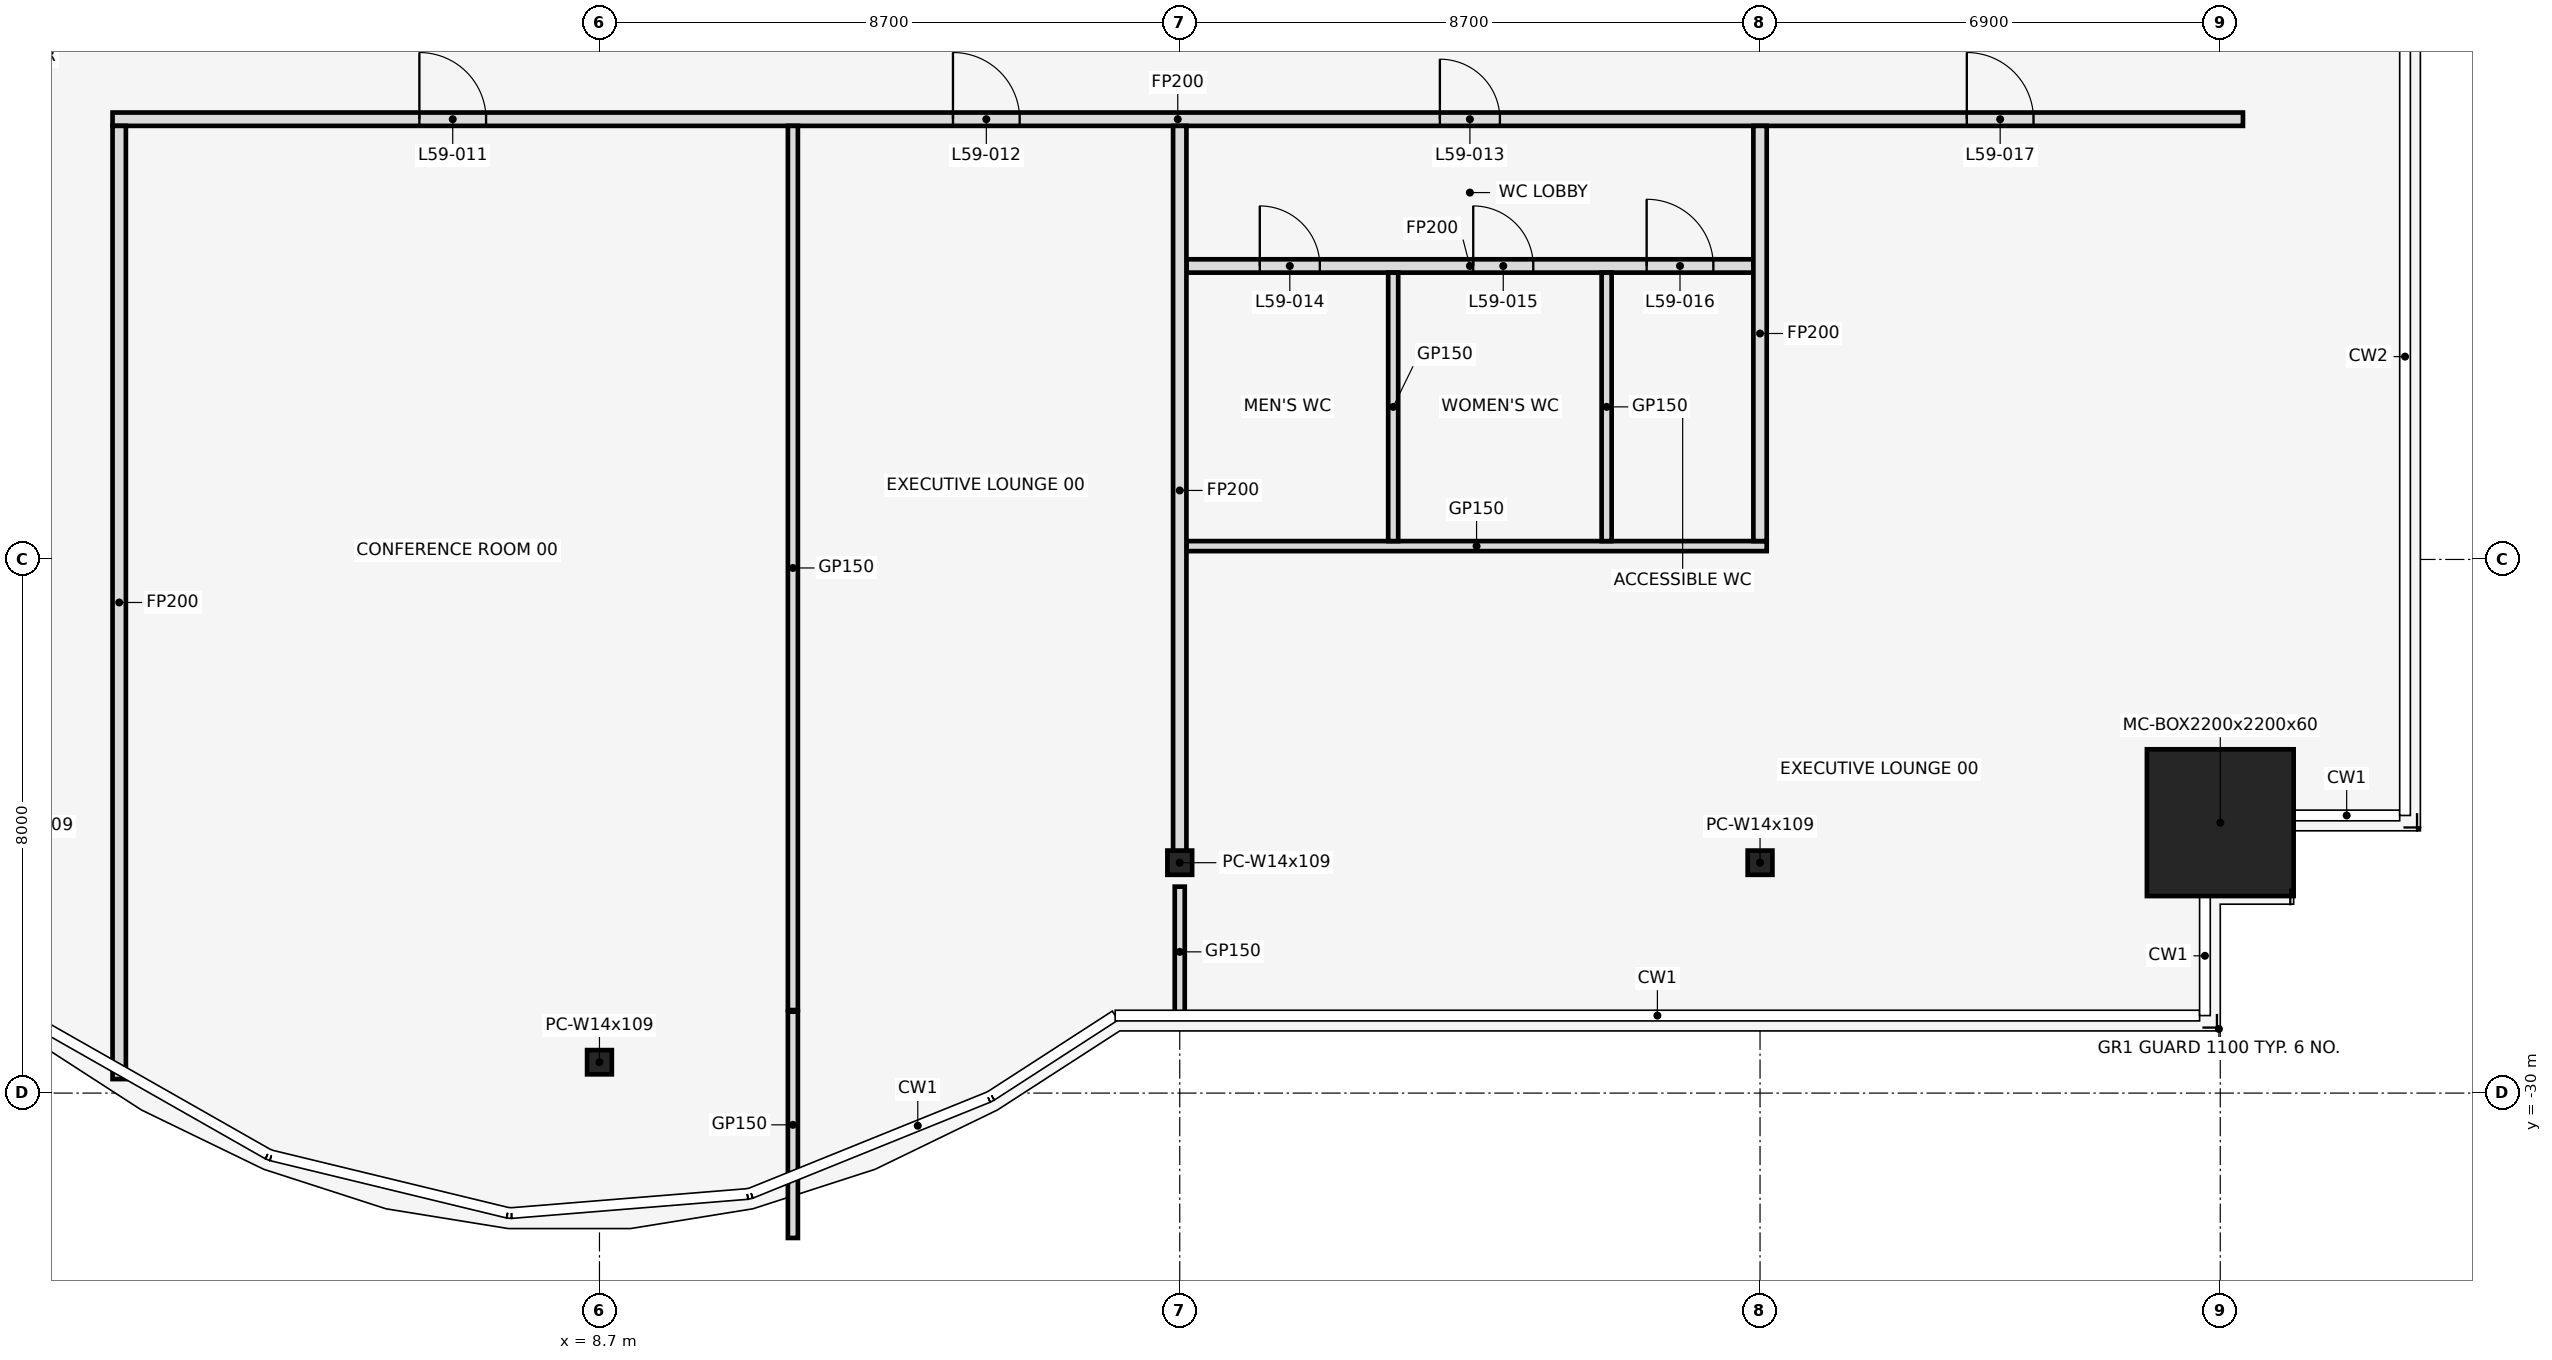
"""IFC4 building model, lengths in metres.
Left out: names, types, materials, properties, quantities, classifications, styles, units other than length and angle.
Written with IfcOpenShell. Run it as: python <this file> out.ifc"""

import sys

from ifc_helpers import new_model, si_unit, direction, frame, frame_2d, origin, origin_2d, place, context, subcontext, project, spatial, rectangle, hollow_rectangle, i_section, extrude, element, fill, save


model = new_model("IFC4")
c1 = context("Model", 3, precision=1e-05, world=origin(), true_north=direction((0.0, 1.0)))
c2 = subcontext(c1, "Body", "Model", "MODEL_VIEW")
j1 = project(units=[si_unit("LENGTHUNIT", "METRE"), si_unit("PLANEANGLEUNIT", "RADIAN")], contexts=[c1])
p1 = place(None, origin())
s1 = spatial("IfcSite", under=j1, at=p1, CompositionType="ELEMENT")
p2 = place(p1, origin())
s2 = spatial("IfcBuilding", under=s1, at=p2, CompositionType="ELEMENT")
p3 = place(p2, frame((0.0, 0.0, 262.4)))
s3 = spatial("IfcBuildingStorey", under=s2, at=p3, CompositionType="ELEMENT", Elevation=262.4)
for number, where, z_axis, x_axis in (
    (1, (8.7, -29.537, 0.0), (0.0, 0.0, 1.0), (1.0, 0.0, 0.0)),
    (2, (17.4, -26.546, 0.0), (0.0, 0.0, 1.0), (1.0, 0.0, 0.0)),
    (3, (26.1, -26.546, 0.0), (0.0, 0.0, 1.0), (1.0, 0.0, 0.0)),
):
    element("IfcColumn", number, at=place(p3, frame(where, z_axis=z_axis, x_axis=x_axis)), inside=s3, PredefinedType="COLUMN", context=c2, shape_type="SweptSolid", body=[
        extrude(i_section(OverallWidth=0.371, OverallDepth=0.363, WebThickness=0.013, FlangeThickness=0.022, at=origin_2d()), origin(), (0.0, 0.0, 1.0), 4.2),
    ])
p4 = place(p3, frame((33.0, -25.946, 0.0), z_axis=(0.0, 0.0, 1.0), x_axis=(1.0, 0.0, 0.0)))
e4 = element("IfcColumn", 4, at=p4, inside=s3, PredefinedType="COLUMN", context=c2, shape_type="SweptSolid", body=[
    extrude(hollow_rectangle(XDim=2.2, YDim=2.2, WallThickness=0.06, at=origin_2d()), origin(), (0.0, 0.0, 1.0), 4.2),
])
p5 = place(p3, frame((17.5, -21.8, 0.0), z_axis=(0.0, 0.0, 1.0), x_axis=(1.0, 0.0, 0.0)))
e5 = element("IfcWall", 5, at=p5, inside=s3, PredefinedType="PARTITIONING", context=c2, shape_type="SweptSolid", body=[
    extrude(rectangle(XDim=8.7, YDim=0.15, at=frame_2d((4.35, 0.0))), origin(), (0.0, 0.0, 1.0), 3.118),
])
p6 = place(p3, frame((17.5, -17.6, 0.0), z_axis=(0.0, 0.0, 1.0), x_axis=(1.0, 0.0, 0.0)))
e6 = element("IfcWall", 6, at=p6, inside=s3, PredefinedType="PARTITIONING", context=c2, shape_type="SweptSolid", body=[
    extrude(rectangle(XDim=8.5, YDim=0.2, at=frame_2d((4.25, 0.0))), origin(), (0.0, 0.0, 1.0), 3.118),
])
p7 = place(p6, frame((1.1, 0.0, 0.0)))
e7 = element("IfcOpeningElement", 7, at=p7, cuts=e6, PredefinedType="OPENING", context=c2, shape_type="SweptSolid", body=[
    extrude(rectangle(XDim=0.9, YDim=2.1, at=frame_2d((0.45, 1.05))), frame((0.0, 0.112, 0.0), z_axis=(0.0, -1.0, 0.0), x_axis=(1.0, 0.0, 0.0)), (0.0, 0.0, 1.0), 0.224),
])
p8 = place(p6, frame((4.3, 0.0, 0.0)))
e8 = element("IfcOpeningElement", 8, at=p8, cuts=e6, PredefinedType="OPENING", context=c2, shape_type="SweptSolid", body=[
    extrude(rectangle(XDim=0.9, YDim=2.1, at=frame_2d((0.45, 1.05))), frame((0.0, 0.112, 0.0), z_axis=(0.0, -1.0, 0.0), x_axis=(1.0, 0.0, 0.0)), (0.0, 0.0, 1.0), 0.224),
])
p9 = place(p6, frame((6.9, 0.0, 0.0)))
e9 = element("IfcOpeningElement", 9, at=p9, cuts=e6, PredefinedType="OPENING", context=c2, shape_type="SweptSolid", body=[
    extrude(rectangle(XDim=1.0, YDim=2.1, at=frame_2d((0.5, 1.05))), frame((0.0, 0.112, 0.0), z_axis=(0.0, -1.0, 0.0), x_axis=(1.0, 0.0, 0.0)), (0.0, 0.0, 1.0), 0.224),
])
p10 = place(p3, frame((1.4, -15.4, 0.0), z_axis=(0.0, 0.0, 1.0), x_axis=(1.0, 0.0, 0.0)))
e10 = element("IfcWall", 10, at=p10, inside=s3, PredefinedType="PARTITIONING", context=c2, shape_type="SweptSolid", body=[
    extrude(rectangle(XDim=31.94, YDim=0.2, at=frame_2d((15.97, 0.0))), origin(), (0.0, 0.0, 1.0), 3.118),
])
p11 = place(p10, frame((4.6, 0.0, 0.0)))
e11 = element("IfcOpeningElement", 11, at=p11, cuts=e10, PredefinedType="OPENING", context=c2, shape_type="SweptSolid", body=[
    extrude(rectangle(XDim=1.0, YDim=2.1, at=frame_2d((0.5, 1.05))), frame((0.0, 0.112, 0.0), z_axis=(0.0, -1.0, 0.0), x_axis=(1.0, 0.0, 0.0)), (0.0, 0.0, 1.0), 0.224),
])
p12 = place(p10, frame((12.6, 0.0, 0.0)))
e12 = element("IfcOpeningElement", 12, at=p12, cuts=e10, PredefinedType="OPENING", context=c2, shape_type="SweptSolid", body=[
    extrude(rectangle(XDim=1.0, YDim=2.1, at=frame_2d((0.5, 1.05))), frame((0.0, 0.112, 0.0), z_axis=(0.0, -1.0, 0.0), x_axis=(1.0, 0.0, 0.0)), (0.0, 0.0, 1.0), 0.224),
])
p13 = place(p10, frame((19.9, 0.0, 0.0)))
e13 = element("IfcOpeningElement", 13, at=p13, cuts=e10, PredefinedType="OPENING", context=c2, shape_type="SweptSolid", body=[
    extrude(rectangle(XDim=0.9, YDim=2.1, at=frame_2d((0.45, 1.05))), frame((0.0, 0.112, 0.0), z_axis=(0.0, -1.0, 0.0), x_axis=(1.0, 0.0, 0.0)), (0.0, 0.0, 1.0), 0.224),
])
p14 = place(p10, frame((27.8, 0.0, 0.0)))
e14 = element("IfcOpeningElement", 14, at=p14, cuts=e10, PredefinedType="OPENING", context=c2, shape_type="SweptSolid", body=[
    extrude(rectangle(XDim=1.0, YDim=2.1, at=frame_2d((0.5, 1.05))), frame((0.0, 0.112, 0.0), z_axis=(0.0, -1.0, 0.0), x_axis=(1.0, 0.0, 0.0)), (0.0, 0.0, 1.0), 0.224),
])
p15 = place(p3, frame((1.5, -29.79, 0.0), z_axis=(0.0, 0.0, 1.0), x_axis=(0.0, 1.0, 0.0)))
e15 = element("IfcWall", 15, at=p15, inside=s3, PredefinedType="PARTITIONING", context=c2, shape_type="SweptSolid", body=[
    extrude(rectangle(XDim=14.29, YDim=0.2, at=frame_2d((7.145, 0.0))), origin(), (0.0, 0.0, 1.0), 3.118),
])
p16 = place(p3, frame((11.6, -32.172, 0.0), z_axis=(0.0, 0.0, 1.0), x_axis=(0.0, 1.0, 0.0)))
e16 = element("IfcWall", 16, at=p16, inside=s3, PredefinedType="PARTITIONING", context=c2, shape_type="SweptSolid", body=[
    extrude(rectangle(XDim=3.392, YDim=0.15, at=frame_2d((1.696, 0.0))), origin(), (0.0, 0.0, 1.0), 3.118),
])
p17 = place(p3, frame((11.6, -28.755, 0.0), z_axis=(0.0, 0.0, 1.0), x_axis=(0.0, 1.0, 0.0)))
e17 = element("IfcWall", 17, at=p17, inside=s3, PredefinedType="PARTITIONING", context=c2, shape_type="SweptSolid", body=[
    extrude(rectangle(XDim=13.255, YDim=0.15, at=frame_2d((6.627, 0.0))), origin(), (0.0, 0.0, 1.0), 3.118),
])
p18 = place(p3, frame((17.4, -28.86, 0.0), z_axis=(0.0, 0.0, 1.0), x_axis=(0.0, 1.0, 0.0)))
e18 = element("IfcWall", 18, at=p18, inside=s3, PredefinedType="PARTITIONING", context=c2, shape_type="SweptSolid", body=[
    extrude(rectangle(XDim=1.955, YDim=0.15, at=frame_2d((0.978, 0.0))), origin(), (0.0, 0.0, 1.0), 3.118),
])
p19 = place(p3, frame((17.4, -26.431, 0.0), z_axis=(0.0, 0.0, 1.0), x_axis=(0.0, 1.0, 0.0)))
e19 = element("IfcWall", 19, at=p19, inside=s3, PredefinedType="PARTITIONING", context=c2, shape_type="SweptSolid", body=[
    extrude(rectangle(XDim=10.931, YDim=0.2, at=frame_2d((5.465, 0.0))), origin(), (0.0, 0.0, 1.0), 3.118),
])
for number, where, z_axis, x_axis in (
    (20, (20.6, -21.725, 0.0), (0.0, 0.0, 1.0), (0.0, 1.0, 0.0)),
    (21, (23.8, -21.725, 0.0), (0.0, 0.0, 1.0), (0.0, 1.0, 0.0)),
):
    element("IfcWall", number, at=place(p3, frame(where, z_axis=z_axis, x_axis=x_axis)), inside=s3, PredefinedType="PARTITIONING", context=c2, shape_type="SweptSolid", body=[
        extrude(rectangle(XDim=4.025, YDim=0.15, at=frame_2d((2.013, 0.0))), origin(), (0.0, 0.0, 1.0), 3.118),
    ])
p20 = place(p3, frame((26.1, -21.725, 0.0), z_axis=(0.0, 0.0, 1.0), x_axis=(0.0, 1.0, 0.0)))
e22 = element("IfcWall", 22, at=p20, inside=s3, PredefinedType="PARTITIONING", context=c2, shape_type="SweptSolid", body=[
    extrude(rectangle(XDim=6.225, YDim=0.2, at=frame_2d((3.113, 0.0))), origin(), (0.0, 0.0, 1.0), 3.118),
])
p21 = place(p11, frame((1.0, 0.0, 0.0), z_axis=(0.0, 0.0, 1.0), x_axis=(-1.0, 0.0, 0.0)))
e23 = element("IfcDoor", 23, at=p21, inside=s3, OperationType="SINGLE_SWING_RIGHT", PredefinedType="DOOR", context=c2, shape_type="SweptSolid", body=[
    extrude(rectangle(XDim=1.0, YDim=2.1, at=frame_2d((0.5, 1.05))), frame((0.0, 0.025, 0.0), z_axis=(0.0, -1.0, 0.0), x_axis=(1.0, 0.0, 0.0)), (0.0, 0.0, 1.0), 0.05),
])
fill(e11, e23)
p22 = place(p12, frame((1.0, 0.0, 0.0), z_axis=(0.0, 0.0, 1.0), x_axis=(-1.0, 0.0, 0.0)))
e24 = element("IfcDoor", 24, at=p22, inside=s3, OperationType="SINGLE_SWING_RIGHT", PredefinedType="DOOR", context=c2, shape_type="SweptSolid", body=[
    extrude(rectangle(XDim=1.0, YDim=2.1, at=frame_2d((0.5, 1.05))), frame((0.0, 0.025, 0.0), z_axis=(0.0, -1.0, 0.0), x_axis=(1.0, 0.0, 0.0)), (0.0, 0.0, 1.0), 0.05),
])
fill(e12, e24)
p23 = place(p13, frame((0.9, 0.0, 0.0), z_axis=(0.0, 0.0, 1.0), x_axis=(-1.0, 0.0, 0.0)))
e25 = element("IfcDoor", 25, at=p23, inside=s3, OperationType="SINGLE_SWING_LEFT", PredefinedType="DOOR", context=c2, shape_type="SweptSolid", body=[
    extrude(rectangle(XDim=0.9, YDim=2.1, at=frame_2d((0.45, 1.05))), frame((0.0, 0.025, 0.0), z_axis=(0.0, -1.0, 0.0), x_axis=(1.0, 0.0, 0.0)), (0.0, 0.0, 1.0), 0.05),
])
fill(e13, e25)
p24 = place(p7, frame((0.9, 0.0, 0.0), z_axis=(0.0, 0.0, 1.0), x_axis=(-1.0, 0.0, 0.0)))
e26 = element("IfcDoor", 26, at=p24, inside=s3, OperationType="SINGLE_SWING_RIGHT", PredefinedType="DOOR", context=c2, shape_type="SweptSolid", body=[
    extrude(rectangle(XDim=0.9, YDim=2.1, at=frame_2d((0.45, 1.05))), frame((0.0, 0.025, 0.0), z_axis=(0.0, -1.0, 0.0), x_axis=(1.0, 0.0, 0.0)), (0.0, 0.0, 1.0), 0.05),
])
fill(e7, e26)
p25 = place(p8, frame((0.9, 0.0, 0.0), z_axis=(0.0, 0.0, 1.0), x_axis=(-1.0, 0.0, 0.0)))
e27 = element("IfcDoor", 27, at=p25, inside=s3, OperationType="SINGLE_SWING_RIGHT", PredefinedType="DOOR", context=c2, shape_type="SweptSolid", body=[
    extrude(rectangle(XDim=0.9, YDim=2.1, at=frame_2d((0.45, 1.05))), frame((0.0, 0.025, 0.0), z_axis=(0.0, -1.0, 0.0), x_axis=(1.0, 0.0, 0.0)), (0.0, 0.0, 1.0), 0.05),
])
fill(e8, e27)
p26 = place(p9, frame((1.0, 0.0, 0.0), z_axis=(0.0, 0.0, 1.0), x_axis=(-1.0, 0.0, 0.0)))
e28 = element("IfcDoor", 28, at=p26, inside=s3, OperationType="SINGLE_SWING_LEFT", PredefinedType="DOOR", context=c2, shape_type="SweptSolid", body=[
    extrude(rectangle(XDim=1.0, YDim=2.1, at=frame_2d((0.5, 1.05))), frame((0.0, 0.025, 0.0), z_axis=(0.0, -1.0, 0.0), x_axis=(1.0, 0.0, 0.0)), (0.0, 0.0, 1.0), 0.05),
])
fill(e9, e28)
p27 = place(p14, frame((1.0, 0.0, 0.0), z_axis=(0.0, 0.0, 1.0), x_axis=(-1.0, 0.0, 0.0)))
e29 = element("IfcDoor", 29, at=p27, inside=s3, OperationType="SINGLE_SWING_RIGHT", PredefinedType="DOOR", context=c2, shape_type="SweptSolid", body=[
    extrude(rectangle(XDim=1.0, YDim=2.1, at=frame_2d((0.5, 1.05))), frame((0.0, 0.025, 0.0), z_axis=(0.0, -1.0, 0.0), x_axis=(1.0, 0.0, 0.0)), (0.0, 0.0, 1.0), 0.05),
])
fill(e14, e29)
save(model, sys.argv[1])
